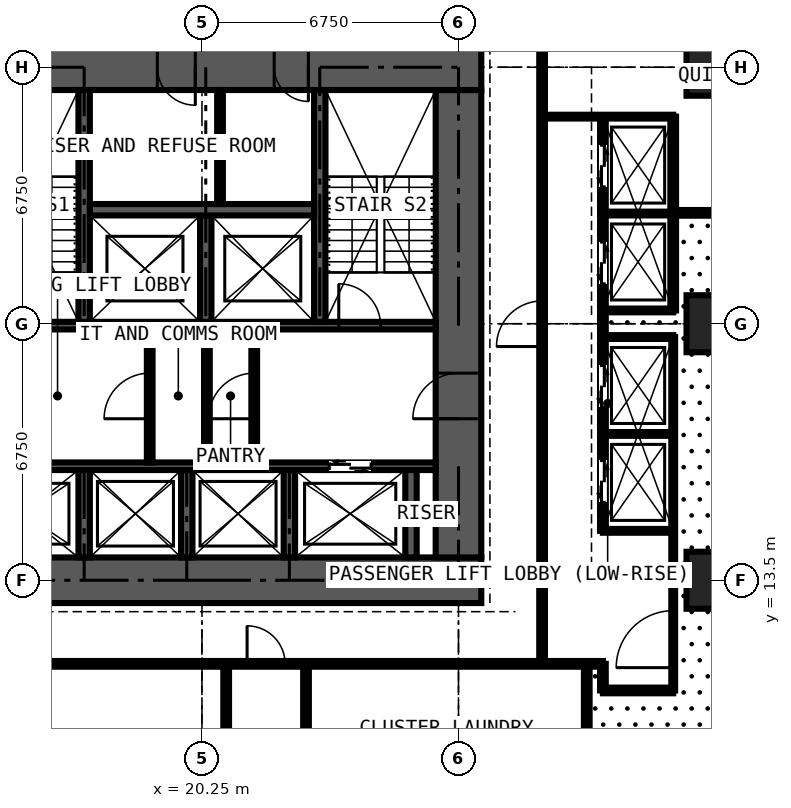
"""IFC4 building model, lengths in metres.
Left out: names, types, materials, properties, quantities, classifications, styles, units other than length and angle.
Written with IfcOpenShell. Run it as: python <this file> out.ifc"""

import sys

from ifc_helpers import new_model, si_unit, direction, frame, frame_2d, origin, origin_2d, place, context, subcontext, project, spatial, rectangle, extrude, element, fill, save


model = new_model("IFC4")
c1 = context("Model", 3, precision=1e-05, world=origin(), true_north=direction((0.0, 1.0)))
c2 = subcontext(c1, "Body", "Model", "MODEL_VIEW")
j1 = project(units=[si_unit("LENGTHUNIT", "METRE"), si_unit("PLANEANGLEUNIT", "RADIAN")], contexts=[c1])
p1 = place(None, origin())
s1 = spatial("IfcSite", under=j1, at=p1, CompositionType="ELEMENT")
p2 = place(p1, origin())
s2 = spatial("IfcBuilding", under=s1, at=p2, CompositionType="ELEMENT")
p3 = place(p2, frame((0.0, 0.0, 108.9)))
s3 = spatial("IfcBuildingStorey", under=s2, at=p3, CompositionType="ELEMENT", Elevation=108.9)
for number, where, z_axis, x_axis in (
    (1, (33.75, 13.5, 0.0), (0.0, 0.0, 1.0), (1.0, 0.0, 0.0)),
    (2, (33.75, 20.25, 0.0), (0.0, 0.0, 1.0), (1.0, 0.0, 0.0)),
    (3, (33.75, 27.0, 0.0), (0.0, 0.0, 1.0), (1.0, 0.0, 0.0)),
):
    element("IfcColumn", number, at=place(p3, frame(where, z_axis=z_axis, x_axis=x_axis)), inside=s3, PredefinedType="COLUMN", context=c2, shape_type="SweptSolid", body=[
        extrude(rectangle(XDim=1.5, YDim=1.5, at=origin_2d()), origin(), (0.0, 0.0, 1.0), 3.6),
    ])
p4 = place(p3, frame((12.9, 13.5, 0.0), z_axis=(0.0, 0.0, 1.0), x_axis=(1.0, 0.0, 0.0)))
e4 = element("IfcWall", 4, at=p4, inside=s3, PredefinedType="SHEAR", context=c2, shape_type="SweptSolid", body=[
    extrude(rectangle(XDim=14.7, YDim=1.2, at=frame_2d((7.35, 0.0))), origin(), (0.0, 0.0, 1.0), 3.6),
])
p5 = place(p3, frame((27.0, 14.1, 0.0), z_axis=(0.0, 0.0, 1.0), x_axis=(0.0, 1.0, 0.0)))
e5 = element("IfcWall", 5, at=p5, inside=s3, PredefinedType="SHEAR", context=c2, shape_type="SweptSolid", body=[
    extrude(rectangle(XDim=12.3, YDim=1.2, at=frame_2d((6.15, 0.0))), origin(), (0.0, 0.0, 1.0), 3.6),
])
p6 = place(p5, frame((3.65, 0.0, 0.0)))
e6 = element("IfcOpeningElement", 6, at=p6, cuts=e5, PredefinedType="OPENING", context=c2, shape_type="SweptSolid", body=[
    extrude(rectangle(XDim=1.2, YDim=2.2, at=frame_2d((0.6, 1.1))), frame((0.0, 0.61, 0.0), z_axis=(0.0, -1.0, 0.0), x_axis=(1.0, 0.0, 0.0)), (0.0, 0.0, 1.0), 1.22),
])
p7 = place(p3, frame((27.6, 27.0, 0.0), z_axis=(0.0, 0.0, 1.0), x_axis=(-1.0, 0.0, 0.0)))
e7 = element("IfcWall", 7, at=p7, inside=s3, PredefinedType="SHEAR", context=c2, shape_type="SweptSolid", body=[
    extrude(rectangle(XDim=14.7, YDim=1.2, at=frame_2d((7.35, 0.0))), origin(), (0.0, 0.0, 1.0), 3.6),
])
p8 = place(p7, frame((4.55, 0.0, 0.0)))
e8 = element("IfcOpeningElement", 8, at=p8, cuts=e7, PredefinedType="OPENING", context=c2, shape_type="SweptSolid", body=[
    extrude(rectangle(XDim=0.9, YDim=2.2, at=frame_2d((0.45, 1.1))), frame((0.0, 0.61, 0.0), z_axis=(0.0, -1.0, 0.0), x_axis=(1.0, 0.0, 0.0)), (0.0, 0.0, 1.0), 1.22),
])
p9 = place(p7, frame((7.525, 0.0, 0.0)))
e9 = element("IfcOpeningElement", 9, at=p9, cuts=e7, PredefinedType="OPENING", context=c2, shape_type="SweptSolid", body=[
    extrude(rectangle(XDim=1.0, YDim=2.2, at=frame_2d((0.5, 1.1))), frame((0.0, 0.61, 0.0), z_axis=(0.0, -1.0, 0.0), x_axis=(1.0, 0.0, 0.0)), (0.0, 0.0, 1.0), 1.22),
])
p10 = place(p3, frame((14.1, 16.5, 0.0), z_axis=(0.0, 0.0, 1.0), x_axis=(1.0, 0.0, 0.0)))
e10 = element("IfcWall", 10, at=p10, inside=s3, PredefinedType="SHEAR", context=c2, shape_type="SweptSolid", body=[
    extrude(rectangle(XDim=12.3, YDim=0.2, at=frame_2d((6.15, 0.0))), origin(), (0.0, 0.0, 1.0), 3.6),
])
p11 = place(p10, frame((0.9, 0.0, 0.0)))
e11 = element("IfcOpeningElement", 11, at=p11, cuts=e10, PredefinedType="OPENING", context=c2, shape_type="SweptSolid", body=[
    extrude(rectangle(XDim=1.1, YDim=2.2, at=frame_2d((0.55, 1.1))), frame((0.0, 0.11, 0.0), z_axis=(0.0, -1.0, 0.0), x_axis=(1.0, 0.0, 0.0)), (0.0, 0.0, 1.0), 0.22),
])
p12 = place(p10, frame((9.5, 0.0, 0.0)))
e12 = element("IfcOpeningElement", 12, at=p12, cuts=e10, PredefinedType="OPENING", context=c2, shape_type="SweptSolid", body=[
    extrude(rectangle(XDim=1.1, YDim=2.2, at=frame_2d((0.55, 1.1))), frame((0.0, 0.11, 0.0), z_axis=(0.0, -1.0, 0.0), x_axis=(1.0, 0.0, 0.0)), (0.0, 0.0, 1.0), 0.22),
])
p13 = place(p3, frame((14.1, 20.2, 0.0), z_axis=(0.0, 0.0, 1.0), x_axis=(1.0, 0.0, 0.0)))
e13 = element("IfcWall", 13, at=p13, inside=s3, PredefinedType="SHEAR", context=c2, shape_type="SweptSolid", body=[
    extrude(rectangle(XDim=12.3, YDim=0.2, at=frame_2d((6.15, 0.0))), origin(), (0.0, 0.0, 1.0), 3.6),
])
p14 = place(p13, frame((0.35, 0.0, 0.0)))
e14 = element("IfcOpeningElement", 14, at=p14, cuts=e13, PredefinedType="OPENING", context=c2, shape_type="SweptSolid", body=[
    extrude(rectangle(XDim=1.1, YDim=2.2, at=frame_2d((0.55, 1.1))), frame((0.0, 0.11, 0.0), z_axis=(0.0, -1.0, 0.0), x_axis=(1.0, 0.0, 0.0)), (0.0, 0.0, 1.0), 0.22),
])
p15 = place(p13, frame((9.75, 0.0, 0.0)))
e15 = element("IfcOpeningElement", 15, at=p15, cuts=e13, PredefinedType="OPENING", context=c2, shape_type="SweptSolid", body=[
    extrude(rectangle(XDim=1.1, YDim=2.2, at=frame_2d((0.55, 1.1))), frame((0.0, 0.11, 0.0), z_axis=(0.0, -1.0, 0.0), x_axis=(1.0, 0.0, 0.0)), (0.0, 0.0, 1.0), 0.22),
])
for number, where, z_axis, x_axis in (
    (16, (17.15, 20.3, 0.0), (0.0, 0.0, 1.0), (0.0, 1.0, 0.0)),
    (17, (23.35, 20.3, 0.0), (0.0, 0.0, 1.0), (0.0, 1.0, 0.0)),
):
    element("IfcWall", number, at=place(p3, frame(where, z_axis=z_axis, x_axis=x_axis)), inside=s3, PredefinedType="SHEAR", context=c2, shape_type="SweptSolid", body=[
        extrude(rectangle(XDim=6.1, YDim=0.3, at=frame_2d((3.05, 0.0))), origin(), (0.0, 0.0, 1.0), 3.6),
    ])
p16 = place(p3, frame((20.35, 20.3, 0.0), z_axis=(0.0, 0.0, 1.0), x_axis=(0.0, 1.0, 0.0)))
e18 = element("IfcWall", 18, at=p16, inside=s3, PredefinedType="SHEAR", context=c2, shape_type="SweptSolid", body=[
    extrude(rectangle(XDim=2.8, YDim=0.3, at=frame_2d((1.4, 0.0))), origin(), (0.0, 0.0, 1.0), 3.6),
])
p17 = place(p3, frame((17.3, 23.25, 0.0), z_axis=(0.0, 0.0, 1.0), x_axis=(1.0, 0.0, 0.0)))
e19 = element("IfcWall", 19, at=p17, inside=s3, PredefinedType="SHEAR", context=c2, shape_type="SweptSolid", body=[
    extrude(rectangle(XDim=5.9, YDim=0.3, at=frame_2d((2.95, 0.0))), origin(), (0.0, 0.0, 1.0), 3.6),
])
for number, where, z_axis, x_axis in (
    (20, (17.15, 14.1, 0.0), (0.0, 0.0, 1.0), (0.0, 1.0, 0.0)),
    (21, (19.85, 14.1, 0.0), (0.0, 0.0, 1.0), (0.0, 1.0, 0.0)),
    (22, (22.55, 14.1, 0.0), (0.0, 0.0, 1.0), (0.0, 1.0, 0.0)),
    (23, (25.75, 14.1, 0.0), (0.0, 0.0, 1.0), (0.0, 1.0, 0.0)),
):
    element("IfcWall", number, at=place(p3, frame(where, z_axis=z_axis, x_axis=x_axis)), inside=s3, PredefinedType="SHEAR", context=c2, shape_type="SweptSolid", body=[
        extrude(rectangle(XDim=2.3, YDim=0.3, at=frame_2d((1.15, 0.0))), origin(), (0.0, 0.0, 1.0), 3.6),
    ])
p18 = place(p3, frame((18.875, 16.6, 0.0), z_axis=(0.0, 0.0, 1.0), x_axis=(0.0, 1.0, 0.0)))
e24 = element("IfcWall", 24, at=p18, inside=s3, PredefinedType="PARTITIONING", context=c2, shape_type="SweptSolid", body=[
    extrude(rectangle(XDim=3.5, YDim=0.15, at=frame_2d((1.75, 0.0))), origin(), (0.0, 0.0, 1.0), 3.375),
])
p19 = place(p18, frame((1.15, 0.0, 0.0)))
e25 = element("IfcOpeningElement", 25, at=p19, cuts=e24, PredefinedType="OPENING", context=c2, shape_type="SweptSolid", body=[
    extrude(rectangle(XDim=1.2, YDim=2.2, at=frame_2d((0.6, 1.1))), frame((0.0, 0.085, 0.0), z_axis=(0.0, -1.0, 0.0), x_axis=(1.0, 0.0, 0.0)), (0.0, 0.0, 1.0), 0.17),
])
p20 = place(p3, frame((21.625, 16.6, 0.0), z_axis=(0.0, 0.0, 1.0), x_axis=(0.0, 1.0, 0.0)))
e26 = element("IfcWall", 26, at=p20, inside=s3, PredefinedType="PARTITIONING", context=c2, shape_type="SweptSolid", body=[
    extrude(rectangle(XDim=3.5, YDim=0.15, at=frame_2d((1.75, 0.0))), origin(), (0.0, 0.0, 1.0), 3.375),
])
p21 = place(p20, frame((1.15, 0.0, 0.0)))
e27 = element("IfcOpeningElement", 27, at=p21, cuts=e26, PredefinedType="OPENING", context=c2, shape_type="SweptSolid", body=[
    extrude(rectangle(XDim=1.2, YDim=2.2, at=frame_2d((0.6, 1.1))), frame((0.0, 0.085, 0.0), z_axis=(0.0, -1.0, 0.0), x_axis=(1.0, 0.0, 0.0)), (0.0, 0.0, 1.0), 0.17),
])
p22 = place(p3, frame((20.38, 16.6, 0.0), z_axis=(0.0, 0.0, 1.0), x_axis=(0.0, 1.0, 0.0)))
e28 = element("IfcWall", 28, at=p22, inside=s3, PredefinedType="PARTITIONING", context=c2, shape_type="SweptSolid", body=[
    extrude(rectangle(XDim=3.5, YDim=0.15, at=frame_2d((1.75, 0.0))), origin(), (0.0, 0.0, 1.0), 3.375),
])
p23 = place(p3, frame((20.725, 23.4, 0.0), z_axis=(0.0, 0.0, 1.0), x_axis=(0.0, 1.0, 0.0)))
e29 = element("IfcWall", 29, at=p23, inside=s3, PredefinedType="PARTITIONING", context=c2, shape_type="SweptSolid", body=[
    extrude(rectangle(XDim=3.0, YDim=0.15, at=frame_2d((1.5, 0.0))), origin(), (0.0, 0.0, 1.0), 3.375),
])
p24 = place(p3, frame((10.125, 11.3, 0.0), z_axis=(0.0, 0.0, 1.0), x_axis=(1.0, 0.0, 0.0)))
e30 = element("IfcWall", 30, at=p24, inside=s3, PredefinedType="PARTITIONING", context=c2, shape_type="SweptSolid", body=[
    extrude(rectangle(XDim=20.675, YDim=0.15, at=frame_2d((10.337, 0.0))), origin(), (0.0, 0.0, 1.0), 3.375),
])
p25 = place(p24, frame((11.312, 0.0, 0.0)))
e31 = element("IfcOpeningElement", 31, at=p25, cuts=e30, PredefinedType="OPENING", context=c2, shape_type="SweptSolid", body=[
    extrude(rectangle(XDim=1.0, YDim=2.2, at=frame_2d((0.5, 1.1))), frame((0.0, 0.085, 0.0), z_axis=(0.0, -1.0, 0.0), x_axis=(1.0, 0.0, 0.0)), (0.0, 0.0, 1.0), 0.17),
])
for number, where, z_axis, x_axis in (
    (32, (20.887, 5.65, 0.0), (0.0, 0.0, 1.0), (0.0, 1.0, 0.0)),
    (33, (22.988, 5.65, 0.0), (0.0, 0.0, 1.0), (0.0, 1.0, 0.0)),
):
    element("IfcWall", number, at=place(p3, frame(where, z_axis=z_axis, x_axis=x_axis)), inside=s3, PredefinedType="PARTITIONING", context=c2, shape_type="SweptSolid", body=[
        extrude(rectangle(XDim=5.65, YDim=0.15, at=frame_2d((2.825, 0.0))), origin(), (0.0, 0.0, 1.0), 3.375),
    ])
p26 = place(p3, frame((29.2, 11.3, 0.0), z_axis=(0.0, 0.0, 1.0), x_axis=(0.0, 1.0, 0.0)))
e34 = element("IfcWall", 34, at=p26, inside=s3, PredefinedType="PARTITIONING", context=c2, shape_type="SweptSolid", body=[
    extrude(rectangle(XDim=20.3, YDim=0.15, at=frame_2d((10.15, 0.0))), origin(), (0.0, 0.0, 1.0), 3.375),
])
p27 = place(p26, frame((8.35, 0.0, 0.0)))
e35 = element("IfcOpeningElement", 35, at=p27, cuts=e34, PredefinedType="OPENING", context=c2, shape_type="SweptSolid", body=[
    extrude(rectangle(XDim=1.2, YDim=2.2, at=frame_2d((0.6, 1.1))), frame((0.0, 0.085, 0.0), z_axis=(0.0, -1.0, 0.0), x_axis=(1.0, 0.0, 0.0)), (0.0, 0.0, 1.0), 0.17),
])
p28 = place(p3, frame((29.2, 25.7, 0.0), z_axis=(0.0, 0.0, 1.0), x_axis=(1.0, 0.0, 0.0)))
e36 = element("IfcWall", 36, at=p28, inside=s3, PredefinedType="SHEAR", context=c2, shape_type="SweptSolid", body=[
    extrude(rectangle(XDim=3.45, YDim=0.1, at=frame_2d((1.725, 0.0))), origin(), (0.0, 0.0, 1.0), 3.375),
])
p29 = place(p3, frame((30.375, -0.734, 0.0), z_axis=(0.0, 0.0, 1.0), x_axis=(0.0, 1.0, 0.0)))
e37 = element("IfcWall", 37, at=p29, inside=s3, PredefinedType="PARTITIONING", context=c2, shape_type="SweptSolid", body=[
    extrude(rectangle(XDim=12.034, YDim=0.15, at=frame_2d((6.017, 0.0))), origin(), (0.0, 0.0, 1.0), 3.375),
])
p30 = place(p3, frame((30.8, 10.6, 0.0), z_axis=(0.0, 0.0, 1.0), x_axis=(0.0, 1.0, 0.0)))
e38 = element("IfcWall", 38, at=p30, inside=s3, PredefinedType="PARTITIONING", context=c2, shape_type="SweptSolid", body=[
    extrude(rectangle(XDim=0.7, YDim=0.15, at=frame_2d((0.35, 0.0))), origin(), (0.0, 0.0, 1.0), 3.375),
])
p31 = place(p3, frame((30.8, 10.6, 0.0), z_axis=(0.0, 0.0, 1.0), x_axis=(1.0, 0.0, 0.0)))
e39 = element("IfcWall", 39, at=p31, inside=s3, PredefinedType="PARTITIONING", context=c2, shape_type="SweptSolid", body=[
    extrude(rectangle(XDim=1.85, YDim=0.15, at=frame_2d((0.925, 0.0))), origin(), (0.0, 0.0, 1.0), 3.375),
])
p32 = place(p3, frame((30.8, 14.8, 0.0), z_axis=(0.0, 0.0, 1.0), x_axis=(0.0, 1.0, 0.0)))
e40 = element("IfcWall", 40, at=p32, inside=s3, PredefinedType="PARTITIONING", context=c2, shape_type="SweptSolid", body=[
    extrude(rectangle(XDim=10.9, YDim=0.15, at=frame_2d((5.45, 0.0))), origin(), (0.0, 0.0, 1.0), 3.375),
])
p33 = place(p32, frame((0.75, 0.0, 0.0)))
e41 = element("IfcOpeningElement", 41, at=p33, cuts=e40, PredefinedType="OPENING", context=c2, shape_type="SweptSolid", body=[
    extrude(rectangle(XDim=1.1, YDim=2.2, at=frame_2d((0.55, 1.1))), frame((0.0, 0.085, 0.0), z_axis=(0.0, -1.0, 0.0), x_axis=(1.0, 0.0, 0.0)), (0.0, 0.0, 1.0), 0.17),
])
p34 = place(p32, frame((3.25, 0.0, 0.0)))
e42 = element("IfcOpeningElement", 42, at=p34, cuts=e40, PredefinedType="OPENING", context=c2, shape_type="SweptSolid", body=[
    extrude(rectangle(XDim=1.1, YDim=2.2, at=frame_2d((0.55, 1.1))), frame((0.0, 0.085, 0.0), z_axis=(0.0, -1.0, 0.0), x_axis=(1.0, 0.0, 0.0)), (0.0, 0.0, 1.0), 0.17),
])
p35 = place(p32, frame((6.5, 0.0, 0.0)))
e43 = element("IfcOpeningElement", 43, at=p35, cuts=e40, PredefinedType="OPENING", context=c2, shape_type="SweptSolid", body=[
    extrude(rectangle(XDim=1.1, YDim=2.2, at=frame_2d((0.55, 1.1))), frame((0.0, 0.085, 0.0), z_axis=(0.0, -1.0, 0.0), x_axis=(1.0, 0.0, 0.0)), (0.0, 0.0, 1.0), 0.17),
])
p36 = place(p32, frame((9.05, 0.0, 0.0)))
e44 = element("IfcOpeningElement", 44, at=p36, cuts=e40, PredefinedType="OPENING", context=c2, shape_type="SweptSolid", body=[
    extrude(rectangle(XDim=1.1, YDim=2.2, at=frame_2d((0.55, 1.1))), frame((0.0, 0.085, 0.0), z_axis=(0.0, -1.0, 0.0), x_axis=(1.0, 0.0, 0.0)), (0.0, 0.0, 1.0), 0.17),
])
for number, where, z_axis, x_axis in (
    (45, (30.8, 14.8, 0.0), (0.0, 0.0, 1.0), (1.0, 0.0, 0.0)),
    (46, (30.8, 17.35, 0.0), (0.0, 0.0, 1.0), (1.0, 0.0, 0.0)),
    (47, (30.8, 19.9, 0.0), (0.0, 0.0, 1.0), (1.0, 0.0, 0.0)),
    (48, (30.8, 20.6, 0.0), (0.0, 0.0, 1.0), (1.0, 0.0, 0.0)),
    (49, (30.8, 23.15, 0.0), (0.0, 0.0, 1.0), (1.0, 0.0, 0.0)),
):
    element("IfcWall", number, at=place(p3, frame(where, z_axis=z_axis, x_axis=x_axis)), inside=s3, PredefinedType="SHEAR", context=c2, shape_type="SweptSolid", body=[
        extrude(rectangle(XDim=1.85, YDim=0.1, at=frame_2d((0.925, 0.0))), origin(), (0.0, 0.0, 1.0), 3.375),
    ])
p37 = place(p3, frame((32.65, 10.6, 0.0), z_axis=(0.0, 0.0, 1.0), x_axis=(0.0, 1.0, 0.0)))
e50 = element("IfcWall", 50, at=p37, inside=s3, PredefinedType="SHEAR", context=c2, shape_type="SweptSolid", body=[
    extrude(rectangle(XDim=9.3, YDim=0.1, at=frame_2d((4.65, 0.0))), origin(), (0.0, 0.0, 1.0), 3.375),
])
p38 = place(p37, frame((0.6, 0.0, 0.0)))
e51 = element("IfcOpeningElement", 51, at=p38, cuts=e50, PredefinedType="OPENING", context=c2, shape_type="SweptSolid", body=[
    extrude(rectangle(XDim=1.5, YDim=2.2, at=frame_2d((0.75, 1.1))), frame((0.0, 0.06, 0.0), z_axis=(0.0, -1.0, 0.0), x_axis=(1.0, 0.0, 0.0)), (0.0, 0.0, 1.0), 0.12),
])
p39 = place(p3, frame((32.65, 20.6, 0.0), z_axis=(0.0, 0.0, 1.0), x_axis=(0.0, 1.0, 0.0)))
e52 = element("IfcWall", 52, at=p39, inside=s3, PredefinedType="PARTITIONING", context=c2, shape_type="SweptSolid", body=[
    extrude(rectangle(XDim=5.1, YDim=0.15, at=frame_2d((2.55, 0.0))), origin(), (0.0, 0.0, 1.0), 3.375),
])
p40 = place(p3, frame((32.65, 23.168, 0.0), z_axis=(0.0, 0.0, 1.0), x_axis=(1.0, 0.0, 0.0)))
e53 = element("IfcWall", 53, at=p40, inside=s3, PredefinedType="PARTITIONING", context=c2, shape_type="SweptSolid", body=[
    extrude(rectangle(XDim=8.584, YDim=0.15, at=frame_2d((4.292, 0.0))), origin(), (0.0, 0.0, 1.0), 3.375),
])
p41 = place(p40, frame((3.5, 0.0, 0.0)))
e54 = element("IfcOpeningElement", 54, at=p41, cuts=e53, PredefinedType="OPENING", context=c2, shape_type="SweptSolid", body=[
    extrude(rectangle(XDim=1.6, YDim=2.4, at=frame_2d((0.8, 1.2))), frame((0.0, 0.085, 0.0), z_axis=(0.0, -1.0, 0.0), x_axis=(1.0, 0.0, 0.0)), (0.0, 0.0, 1.0), 0.17),
])
p42 = place(p12, origin())
e55 = element("IfcDoor", 55, at=p42, inside=s3, OperationType="DOUBLE_DOOR_SLIDING", PredefinedType="DOOR", context=c2, shape_type="SweptSolid", body=[
    extrude(rectangle(XDim=1.1, YDim=2.2, at=frame_2d((0.55, 1.1))), frame((0.0, 0.025, 0.0), z_axis=(0.0, -1.0, 0.0), x_axis=(1.0, 0.0, 0.0)), (0.0, 0.0, 1.0), 0.05),
])
fill(e12, e55)
p43 = place(p6, origin())
e56 = element("IfcDoor", 56, at=p43, inside=s3, OperationType="DOUBLE_DOOR_SINGLE_SWING", PredefinedType="DOOR", context=c2, shape_type="SweptSolid", body=[
    extrude(rectangle(XDim=1.2, YDim=2.2, at=frame_2d((0.6, 1.1))), frame((0.0, 0.025, 0.0), z_axis=(0.0, -1.0, 0.0), x_axis=(1.0, 0.0, 0.0)), (0.0, 0.0, 1.0), 0.05),
])
fill(e6, e56)
p44 = place(p19, origin())
e57 = element("IfcDoor", 57, at=p44, inside=s3, OperationType="DOUBLE_DOOR_SINGLE_SWING", PredefinedType="DOOR", context=c2, shape_type="SweptSolid", body=[
    extrude(rectangle(XDim=1.2, YDim=2.2, at=frame_2d((0.6, 1.1))), frame((0.0, 0.025, 0.0), z_axis=(0.0, -1.0, 0.0), x_axis=(1.0, 0.0, 0.0)), (0.0, 0.0, 1.0), 0.05),
])
fill(e25, e57)
p45 = place(p21, origin())
e58 = element("IfcDoor", 58, at=p45, inside=s3, OperationType="DOUBLE_DOOR_SINGLE_SWING", PredefinedType="DOOR", context=c2, shape_type="SweptSolid", body=[
    extrude(rectangle(XDim=1.2, YDim=2.2, at=frame_2d((0.6, 1.1))), frame((0.0, 0.025, 0.0), z_axis=(0.0, -1.0, 0.0), x_axis=(1.0, 0.0, 0.0)), (0.0, 0.0, 1.0), 0.05),
])
fill(e27, e58)
p46 = place(p8, origin())
e59 = element("IfcDoor", 59, at=p46, inside=s3, OperationType="SINGLE_SWING_LEFT", PredefinedType="DOOR", context=c2, shape_type="SweptSolid", body=[
    extrude(rectangle(XDim=0.9, YDim=2.2, at=frame_2d((0.45, 1.1))), frame((0.0, 0.4, 0.0), z_axis=(0.0, -1.0, 0.0), x_axis=(1.0, 0.0, 0.0)), (0.0, 0.0, 1.0), 0.8),
])
fill(e8, e59)
p47 = place(p9, origin())
e60 = element("IfcDoor", 60, at=p47, inside=s3, OperationType="SINGLE_SWING_LEFT", PredefinedType="DOOR", context=c2, shape_type="SweptSolid", body=[
    extrude(rectangle(XDim=1.0, YDim=2.2, at=frame_2d((0.5, 1.1))), frame((0.0, 0.025, 0.0), z_axis=(0.0, -1.0, 0.0), x_axis=(1.0, 0.0, 0.0)), (0.0, 0.0, 1.0), 0.05),
])
fill(e9, e60)
p48 = place(p15, origin())
e61 = element("IfcDoor", 61, at=p48, inside=s3, OperationType="SINGLE_SWING_LEFT", PredefinedType="DOOR", context=c2, shape_type="SweptSolid", body=[
    extrude(rectangle(XDim=1.1, YDim=2.2, at=frame_2d((0.55, 1.1))), frame((0.0, 0.025, 0.0), z_axis=(0.0, -1.0, 0.0), x_axis=(1.0, 0.0, 0.0)), (0.0, 0.0, 1.0), 0.05),
])
fill(e15, e61)
p49 = place(p25, origin())
e62 = element("IfcDoor", 62, at=p49, inside=s3, OperationType="SINGLE_SWING_LEFT", PredefinedType="DOOR", context=c2, shape_type="SweptSolid", body=[
    extrude(rectangle(XDim=1.0, YDim=2.2, at=frame_2d((0.5, 1.1))), frame((0.0, 0.025, 0.0), z_axis=(0.0, -1.0, 0.0), x_axis=(1.0, 0.0, 0.0)), (0.0, 0.0, 1.0), 0.05),
])
fill(e31, e62)
p50 = place(p38, origin())
e63 = element("IfcDoor", 63, at=p50, inside=s3, OperationType="DOUBLE_DOOR_SINGLE_SWING", PredefinedType="DOOR", context=c2, shape_type="SweptSolid", body=[
    extrude(rectangle(XDim=1.5, YDim=2.2, at=frame_2d((0.75, 1.1))), frame((0.0, 0.025, 0.0), z_axis=(0.0, -1.0, 0.0), x_axis=(1.0, 0.0, 0.0)), (0.0, 0.0, 1.0), 0.05),
])
fill(e51, e63)
p51 = place(p33, origin())
e64 = element("IfcDoor", 64, at=p51, inside=s3, OperationType="DOUBLE_DOOR_SLIDING", PredefinedType="DOOR", context=c2, shape_type="SweptSolid", body=[
    extrude(rectangle(XDim=1.1, YDim=2.2, at=frame_2d((0.55, 1.1))), frame((0.0, 0.025, 0.0), z_axis=(0.0, -1.0, 0.0), x_axis=(1.0, 0.0, 0.0)), (0.0, 0.0, 1.0), 0.05),
])
fill(e41, e64)
p52 = place(p34, origin())
e65 = element("IfcDoor", 65, at=p52, inside=s3, OperationType="DOUBLE_DOOR_SLIDING", PredefinedType="DOOR", context=c2, shape_type="SweptSolid", body=[
    extrude(rectangle(XDim=1.1, YDim=2.2, at=frame_2d((0.55, 1.1))), frame((0.0, 0.025, 0.0), z_axis=(0.0, -1.0, 0.0), x_axis=(1.0, 0.0, 0.0)), (0.0, 0.0, 1.0), 0.05),
])
fill(e42, e65)
p53 = place(p35, origin())
e66 = element("IfcDoor", 66, at=p53, inside=s3, OperationType="DOUBLE_DOOR_SLIDING", PredefinedType="DOOR", context=c2, shape_type="SweptSolid", body=[
    extrude(rectangle(XDim=1.1, YDim=2.2, at=frame_2d((0.55, 1.1))), frame((0.0, 0.025, 0.0), z_axis=(0.0, -1.0, 0.0), x_axis=(1.0, 0.0, 0.0)), (0.0, 0.0, 1.0), 0.05),
])
fill(e43, e66)
p54 = place(p36, origin())
e67 = element("IfcDoor", 67, at=p54, inside=s3, OperationType="DOUBLE_DOOR_SLIDING", PredefinedType="DOOR", context=c2, shape_type="SweptSolid", body=[
    extrude(rectangle(XDim=1.1, YDim=2.2, at=frame_2d((0.55, 1.1))), frame((0.0, 0.025, 0.0), z_axis=(0.0, -1.0, 0.0), x_axis=(1.0, 0.0, 0.0)), (0.0, 0.0, 1.0), 0.05),
])
fill(e44, e67)
p55 = place(p27, origin())
e68 = element("IfcDoor", 68, at=p55, inside=s3, OperationType="DOUBLE_DOOR_SINGLE_SWING", PredefinedType="DOOR", context=c2, shape_type="SweptSolid", body=[
    extrude(rectangle(XDim=1.2, YDim=2.2, at=frame_2d((0.6, 1.1))), frame((0.0, 0.025, 0.0), z_axis=(0.0, -1.0, 0.0), x_axis=(1.0, 0.0, 0.0)), (0.0, 0.0, 1.0), 0.05),
])
fill(e35, e68)
save(model, sys.argv[1])
